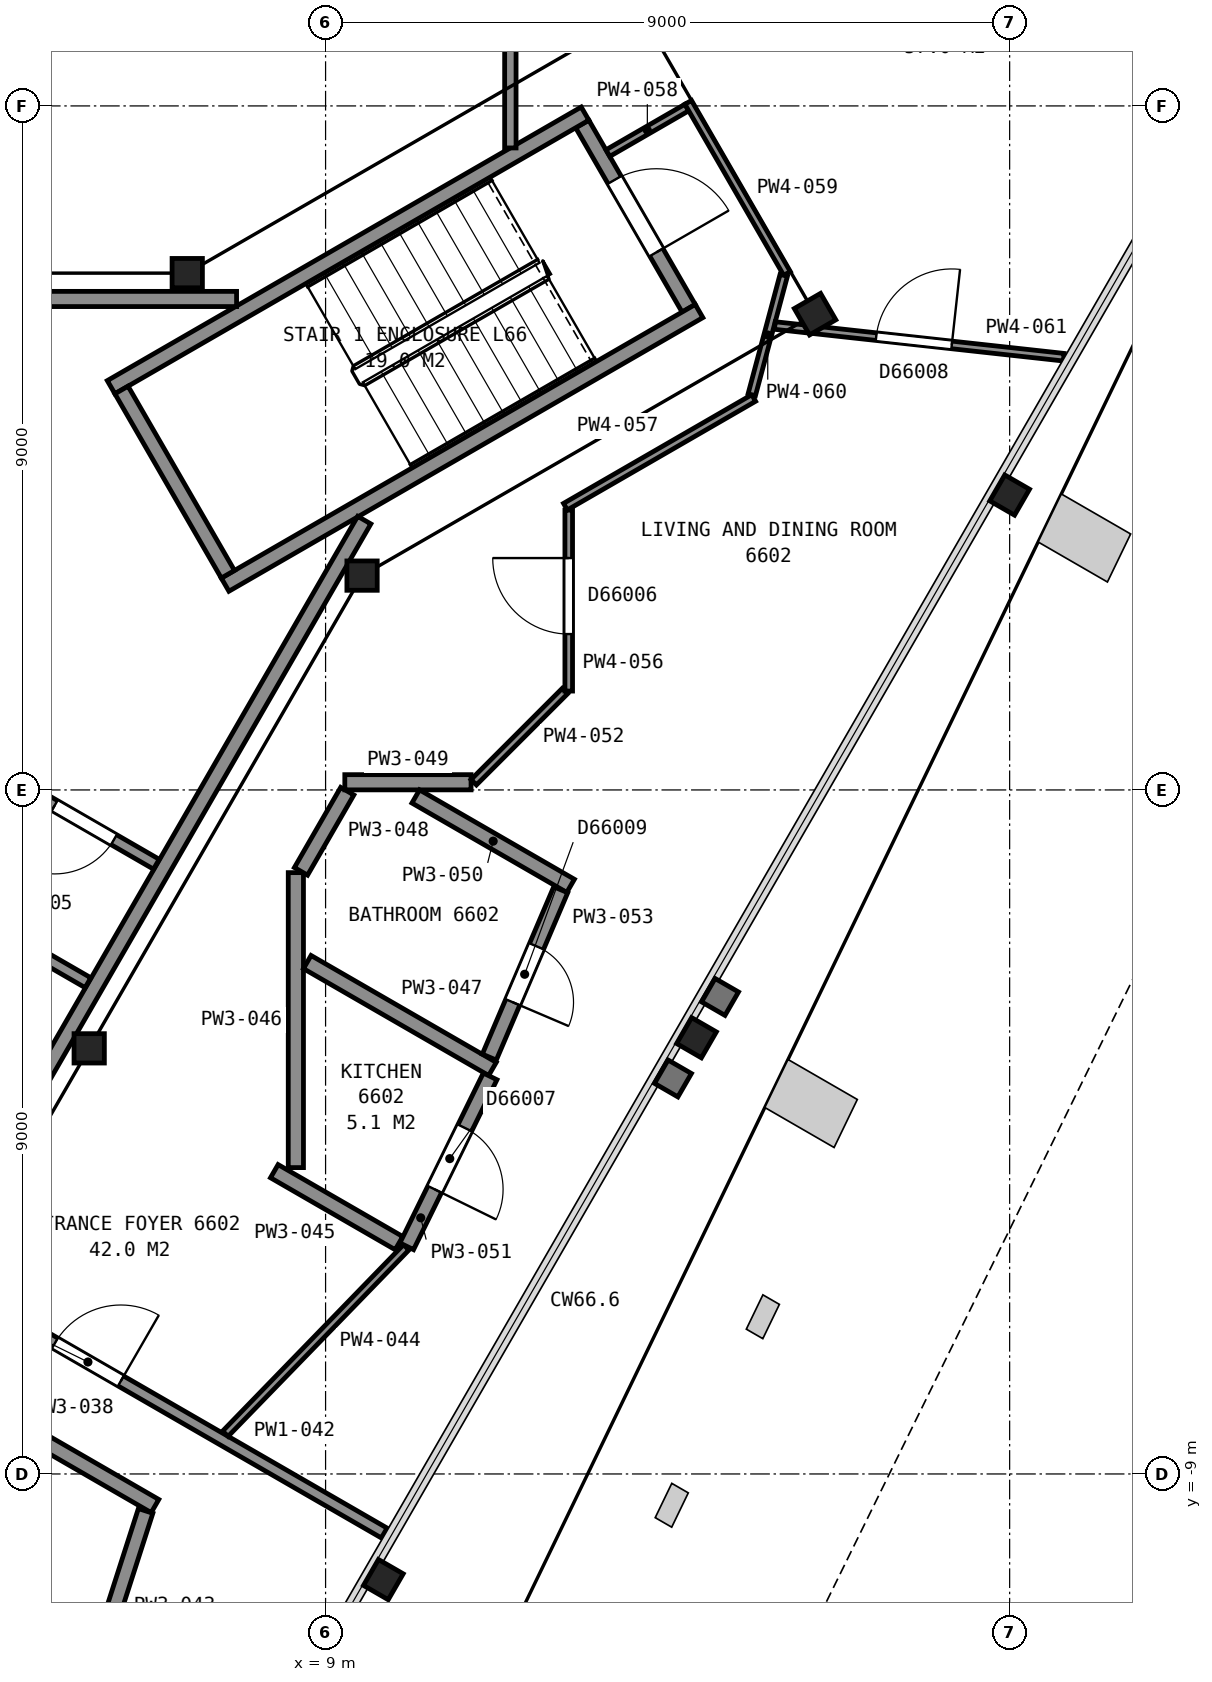
"""IFC4 building model, lengths in metres.
Left out: names, types, materials, properties, quantities, classifications, styles, units other than length and angle.
Written with IfcOpenShell. Run it as: python <this file> out.ifc"""

import sys

from ifc_helpers import new_model, si_unit, direction, frame, frame_2d, origin, origin_2d, place, context, subcontext, project, spatial, rectangle, i_section, extrude, element, fill, save


model = new_model("IFC4")
c1 = context("Model", 3, precision=1e-05, world=origin(), true_north=direction((0.0, 1.0)))
c2 = subcontext(c1, "Body", "Model", "MODEL_VIEW")
j1 = project(units=[si_unit("LENGTHUNIT", "METRE"), si_unit("PLANEANGLEUNIT", "RADIAN")], contexts=[c1])
p1 = place(None, origin())
s1 = spatial("IfcSite", under=j1, at=p1, CompositionType="ELEMENT")
p2 = place(p1, origin())
s2 = spatial("IfcBuilding", under=s1, at=p2, CompositionType="ELEMENT")
p3 = place(p2, frame((0.0, 0.0, 264.0)))
s3 = spatial("IfcBuildingStorey", under=s2, at=p3, CompositionType="ELEMENT", Elevation=264.0)
for number, where, z_axis, x_axis in (
    (1, (9.76, -10.39, 0.0), (0.0, 0.0, 1.0), (-0.5, -0.866, 0.0)),
    (2, (13.88, -3.26, 0.0), (0.0, 0.0, 1.0), (-0.5, -0.866, 0.0)),
    (3, (18.0, 3.88, 0.0), (0.0, 0.0, 1.0), (-0.5, -0.866, 0.0)),
):
    element("IfcColumn", number, at=place(p3, frame(where, z_axis=z_axis, x_axis=x_axis)), inside=s3, PredefinedType="COLUMN", context=c2, shape_type="SweptSolid", body=[
        extrude(i_section(OverallWidth=0.394, OverallDepth=0.376, WebThickness=0.017, FlangeThickness=0.028, FilletRadius=0.015, at=origin_2d()), origin(), (0.0, 0.0, 1.0), 3.7),
    ])
p4 = place(p3, frame((9.48, 2.82, 0.065), z_axis=(0.0, 0.0, 1.0), x_axis=(1.0, 0.0, 0.0)))
e4 = element("IfcColumn", 4, at=p4, inside=s3, PredefinedType="COLUMN", context=c2, shape_type="SweptSolid", body=[
    extrude(i_section(OverallWidth=0.399, OverallDepth=0.386, WebThickness=0.021, FlangeThickness=0.033, FilletRadius=0.015, at=origin_2d()), origin(), (0.0, 0.0, 1.0), 3.635),
])
p5 = place(p3, frame((15.44, 6.26, 0.05), z_axis=(0.0, 0.0, 1.0), x_axis=(0.5, -0.866025403784, 0.0)))
e5 = element("IfcColumn", 5, at=p5, inside=s3, PredefinedType="COLUMN", context=c2, shape_type="SweptSolid", body=[
    extrude(i_section(OverallWidth=0.401, OverallDepth=0.399, WebThickness=0.025, FlangeThickness=0.04, FilletRadius=0.015, at=origin_2d()), origin(), (0.0, 0.0, 1.0), 3.65),
])
p6 = place(p3, frame((7.18, 6.8, 0.065), z_axis=(0.0, 0.0, 1.0), x_axis=(1.0, 0.0, 0.0)))
e6 = element("IfcColumn", 6, at=p6, inside=s3, PredefinedType="COLUMN", context=c2, shape_type="SweptSolid", body=[
    extrude(i_section(OverallWidth=0.399, OverallDepth=0.386, WebThickness=0.021, FlangeThickness=0.033, FilletRadius=0.015, at=origin_2d()), origin(), (0.0, 0.0, 1.0), 3.635),
])
p7 = place(p3, frame((5.89, -3.4, 0.04), z_axis=(0.0, 0.0, 1.0), x_axis=(1.0, 0.0, 0.0)))
e7 = element("IfcColumn", 7, at=p7, inside=s3, PredefinedType="COLUMN", context=c2, shape_type="SweptSolid", body=[
    extrude(i_section(OverallWidth=0.399, OverallDepth=0.386, WebThickness=0.021, FlangeThickness=0.033, FilletRadius=0.015, at=origin_2d()), origin(), (0.0, 0.0, 1.0), 3.66),
])
p8 = place(p3, frame((13.777, 6.338, 0.0), z_axis=(0.0, 0.0, 1.0), x_axis=(-0.500049511043, 0.865996816683, 0.0)))
e8 = element("IfcWall", 8, at=p8, inside=s3, PredefinedType="PARTITIONING", context=c2, shape_type="SweptSolid", body=[
    extrude(rectangle(XDim=2.8, YDim=0.2, at=frame_2d((1.4, 0.0))), origin(), (0.0, 0.0, 1.0), 3.45),
])
p9 = place(p8, frame((0.85, 0.0, 0.0)))
e9 = element("IfcOpeningElement", 9, at=p9, cuts=e8, PredefinedType="OPENING", context=c2, shape_type="SweptSolid", body=[
    extrude(rectangle(XDim=1.1, YDim=2.1, at=frame_2d((0.55, 1.05))), frame((0.0, 0.11, 0.0), z_axis=(0.0, -1.0, 0.0), x_axis=(1.0, 0.0, 0.0)), (0.0, 0.0, 1.0), 0.22),
])
for number, where, z_axis, x_axis in (
    (10, (6.178, 5.299, 0.0), (0.0, 0.0, 1.0), (0.866, 0.5, 0.0)),
    (11, (7.678, 2.701, 0.0), (0.0, 0.0, 1.0), (0.866, 0.5, 0.0)),
):
    element("IfcWall", number, at=place(p3, frame(where, z_axis=z_axis, x_axis=x_axis)), inside=s3, PredefinedType="PARTITIONING", context=c2, shape_type="SweptSolid", body=[
        extrude(rectangle(XDim=7.2, YDim=0.2, at=frame_2d((3.6, 0.0))), origin(), (0.0, 0.0, 1.0), 3.45),
    ])
p10 = place(p3, frame((7.715, 2.838, 0.0), z_axis=(0.0, 0.0, 1.0), x_axis=(-0.500049511043, 0.865996816683, 0.0)))
e12 = element("IfcWall", 12, at=p10, inside=s3, PredefinedType="PARTITIONING", context=c2, shape_type="SweptSolid", body=[
    extrude(rectangle(XDim=2.8, YDim=0.2, at=frame_2d((1.4, 0.0))), origin(), (0.0, 0.0, 1.0), 3.45),
])
p11 = place(p3, frame((7.829, 6.46, 0.0), z_axis=(0.0, 0.0, 1.0), x_axis=(-1.0, 0.0, 0.0)))
e13 = element("IfcWall", 13, at=p11, inside=s3, PredefinedType="PARTITIONING", context=c2, shape_type="SweptSolid", body=[
    extrude(rectangle(XDim=15.658, YDim=0.2, at=frame_2d((7.829, 0.0))), origin(), (0.0, 0.0, 1.0), 3.45),
])
p12 = place(p11, frame((12.168, 0.0, 0.0)))
e14 = element("IfcOpeningElement", 14, at=p12, cuts=e13, PredefinedType="OPENING", context=c2, shape_type="SweptSolid", body=[
    extrude(rectangle(XDim=1.2, YDim=2.1, at=frame_2d((0.6, 1.05))), frame((0.0, 0.11, 0.0), z_axis=(0.0, -1.0, 0.0), x_axis=(1.0, 0.0, 0.0)), (0.0, 0.0, 1.0), 0.22),
])
p13 = place(p3, frame((3.828, -6.29, 0.0), z_axis=(0.0, 0.0, 1.0), x_axis=(0.499979739078, 0.866037101117, 0.0)))
e15 = element("IfcWall", 15, at=p13, inside=s3, PredefinedType="PARTITIONING", context=c2, shape_type="SweptSolid", body=[
    extrude(rectangle(XDim=11.363, YDim=0.2, at=frame_2d((5.681, 0.0))), origin(), (0.0, 0.0, 1.0), 3.45),
])
p14 = place(p13, frame((0.55, 0.0, 0.0)))
e16 = element("IfcOpeningElement", 16, at=p14, cuts=e15, PredefinedType="OPENING", context=c2, shape_type="SweptSolid", body=[
    extrude(rectangle(XDim=1.2, YDim=2.1, at=frame_2d((0.6, 1.05))), frame((0.0, 0.11, 0.0), z_axis=(0.0, -1.0, 0.0), x_axis=(1.0, 0.0, 0.0)), (0.0, 0.0, 1.0), 0.22),
])
p15 = place(p3, frame((3.951, -1.427, 0.0), z_axis=(0.0, 0.0, 1.0), x_axis=(0.866062920605, -0.499935013329, 0.0)))
e17 = element("IfcWall", 17, at=p15, inside=s3, PredefinedType="PARTITIONING", context=c2, shape_type="SweptSolid", body=[
    extrude(rectangle(XDim=2.22, YDim=0.15, at=frame_2d((1.11, 0.0))), origin(), (0.0, 0.0, 1.0), 3.45),
])
p16 = place(p3, frame((6.774, -0.978, 0.0), z_axis=(0.0, 0.0, 1.0), x_axis=(-0.866062920605, 0.499935013329, 0.0)))
e18 = element("IfcWall", 18, at=p16, inside=s3, PredefinedType="PARTITIONING", context=c2, shape_type="SweptSolid", body=[
    extrude(rectangle(XDim=2.22, YDim=0.15, at=frame_2d((1.11, 0.0))), origin(), (0.0, 0.0, 1.0), 3.45),
])
p17 = place(p16, frame((0.646, 0.0, 0.0)))
e19 = element("IfcOpeningElement", 19, at=p17, cuts=e18, PredefinedType="OPENING", context=c2, shape_type="SweptSolid", body=[
    extrude(rectangle(XDim=0.9, YDim=2.1, at=frame_2d((0.45, 1.05))), frame((0.0, 0.085, 0.0), z_axis=(0.0, -1.0, 0.0), x_axis=(1.0, 0.0, 0.0)), (0.0, 0.0, 1.0), 0.17),
])
p18 = place(p3, frame((3.498, -7.541, 0.0), z_axis=(0.0, 0.0, 1.0), x_axis=(0.865985624761, -0.500068892961, 0.0)))
e20 = element("IfcWall", 20, at=p18, inside=s3, PredefinedType="PARTITIONING", context=c2, shape_type="SweptSolid", body=[
    extrude(rectangle(XDim=3.762, YDim=0.2, at=frame_2d((1.881, 0.0))), origin(), (0.0, 0.0, 1.0), 2.723),
])
p19 = place(p3, frame((3.682, -10.65, 0.0), z_axis=(0.0, 0.0, 1.0), x_axis=(0.86607302589, -0.499917507021, 0.0)))
e21 = element("IfcWall", 21, at=p19, inside=s3, PredefinedType="PARTITIONING", context=c2, shape_type="SweptSolid", body=[
    extrude(rectangle(XDim=2.384, YDim=0.2, at=frame_2d((1.192, 0.0))), origin(), (0.0, 0.0, 1.0), 2.723),
])
p20 = place(p19, frame((0.85, 0.0, 0.0)))
e22 = element("IfcOpeningElement", 22, at=p20, cuts=e21, PredefinedType="OPENING", context=c2, shape_type="SweptSolid", body=[
    extrude(rectangle(XDim=0.9, YDim=2.1, at=frame_2d((0.45, 1.05))), frame((0.0, 0.11, 0.0), z_axis=(0.0, -1.0, 0.0), x_axis=(1.0, 0.0, 0.0)), (0.0, 0.0, 1.0), 0.22),
])
p21 = place(p3, frame((9.772, -9.777, 0.0), z_axis=(0.0, 0.0, 1.0), x_axis=(-0.866083818164, 0.499898809675, 0.0)))
e23 = element("IfcWall", 23, at=p21, inside=s3, PredefinedType="PARTITIONING", context=c2, shape_type="SweptSolid", body=[
    extrude(rectangle(XDim=6.551, YDim=0.15, at=frame_2d((3.275, 0.0))), origin(), (0.0, 0.0, 1.0), 2.723),
])
p22 = place(p21, frame((4.001, 0.0, 0.0)))
e24 = element("IfcOpeningElement", 24, at=p22, cuts=e23, PredefinedType="OPENING", context=c2, shape_type="SweptSolid", body=[
    extrude(rectangle(XDim=1.0, YDim=2.1, at=frame_2d((0.5, 1.05))), frame((0.0, 0.085, 0.0), z_axis=(0.0, -1.0, 0.0), x_axis=(1.0, 0.0, 0.0)), (0.0, 0.0, 1.0), 0.17),
])
p23 = place(p3, frame((5.824, -11.999, 0.0), z_axis=(0.0, 0.0, 1.0), x_axis=(0.306054089199, 0.95201412515, 0.0)))
e25 = element("IfcWall", 25, at=p23, inside=s3, PredefinedType="PARTITIONING", context=c2, shape_type="SweptSolid", body=[
    extrude(rectangle(XDim=2.64, YDim=0.2, at=frame_2d((1.32, 0.0))), origin(), (0.0, 0.0, 1.0), 2.723),
])
p24 = place(p3, frame((7.682, -8.47, 0.0), z_axis=(0.0, 0.0, 1.0), x_axis=(0.696344433623, 0.717707760696, 0.0)))
e26 = element("IfcWall", 26, at=p24, inside=s3, PredefinedType="PARTITIONING", context=c2, shape_type="SweptSolid", body=[
    extrude(rectangle(XDim=3.417, YDim=0.1, at=frame_2d((1.708, 0.0))), origin(), (0.0, 0.0, 1.0), 2.723),
])
p25 = place(p3, frame((8.325, -5.016, 0.0), z_axis=(0.0, 0.0, 1.0), x_axis=(0.866093293964, -0.499882392319, 0.0)))
e27 = element("IfcWall", 27, at=p25, inside=s3, PredefinedType="PARTITIONING", context=c2, shape_type="SweptSolid", body=[
    extrude(rectangle(XDim=1.894, YDim=0.2, at=frame_2d((0.947, 0.0))), origin(), (0.0, 0.0, 1.0), 2.723),
])
p26 = place(p3, frame((8.609, -4.969, 0.0), z_axis=(0.0, 0.0, 1.0), x_axis=(0.0, 1.0, 0.0)))
e28 = element("IfcWall", 28, at=p26, inside=s3, PredefinedType="PARTITIONING", context=c2, shape_type="SweptSolid", body=[
    extrude(rectangle(XDim=3.881, YDim=0.2, at=frame_2d((1.94, 0.0))), origin(), (0.0, 0.0, 1.0), 2.723),
])
p27 = place(p3, frame((8.759, -2.265, 0.0), z_axis=(0.0, 0.0, 1.0), x_axis=(0.866098885879, -0.499872703674, 0.0)))
e29 = element("IfcWall", 29, at=p27, inside=s3, PredefinedType="PARTITIONING", context=c2, shape_type="SweptSolid", body=[
    extrude(rectangle(XDim=2.813, YDim=0.2, at=frame_2d((1.407, 0.0))), origin(), (0.0, 0.0, 1.0), 2.723),
])
p28 = place(p3, frame((8.677, -1.071, 0.0), z_axis=(0.0, 0.0, 1.0), x_axis=(0.499803412959, 0.86613887362, 0.0)))
e30 = element("IfcWall", 30, at=p28, inside=s3, PredefinedType="PARTITIONING", context=c2, shape_type="SweptSolid", body=[
    extrude(rectangle(XDim=1.218, YDim=0.2, at=frame_2d((0.609, 0.0))), origin(), (0.0, 0.0, 1.0), 2.723),
])
p29 = place(p3, frame((9.253, 0.101, 0.0), z_axis=(0.0, 0.0, 1.0), x_axis=(1.0, 0.0, 0.0)))
e31 = element("IfcWall", 31, at=p29, inside=s3, PredefinedType="PARTITIONING", context=c2, shape_type="SweptSolid", body=[
    extrude(rectangle(XDim=1.661, YDim=0.2, at=frame_2d((0.831, 0.0))), origin(), (0.0, 0.0, 1.0), 2.723),
])
p30 = place(p3, frame((10.186, -0.086, 0.0), z_axis=(0.0, 0.0, 1.0), x_axis=(0.866024864377, -0.50000093428, 0.0)))
e32 = element("IfcWall", 32, at=p30, inside=s3, PredefinedType="PARTITIONING", context=c2, shape_type="SweptSolid", body=[
    extrude(rectangle(XDim=2.353, YDim=0.2, at=frame_2d((1.176, 0.0))), origin(), (0.0, 0.0, 1.0), 2.723),
])
p31 = place(p3, frame((10.068, -6.005, 0.0), z_axis=(0.0, 0.0, 1.0), x_axis=(0.440614307878, 0.897696514248, 0.0)))
e33 = element("IfcWall", 33, at=p31, inside=s3, PredefinedType="PARTITIONING", context=c2, shape_type="SweptSolid", body=[
    extrude(rectangle(XDim=2.491, YDim=0.2, at=frame_2d((1.245, 0.0))), origin(), (0.0, 0.0, 1.0), 2.723),
])
p32 = place(p31, frame((0.835, 0.0, 0.0)))
e34 = element("IfcOpeningElement", 34, at=p32, cuts=e33, PredefinedType="OPENING", context=c2, shape_type="SweptSolid", body=[
    extrude(rectangle(XDim=0.9, YDim=2.1, at=frame_2d((0.45, 1.05))), frame((0.0, 0.11, 0.0), z_axis=(0.0, -1.0, 0.0), x_axis=(1.0, 0.0, 0.0)), (0.0, 0.0, 1.0), 0.22),
])
p33 = place(p3, frame((10.949, 0.101, 0.0), z_axis=(0.0, 0.0, 1.0), x_axis=(0.707106781187, 0.707106781187, 0.0)))
e35 = element("IfcWall", 35, at=p33, inside=s3, PredefinedType="PARTITIONING", context=c2, shape_type="SweptSolid", body=[
    extrude(rectangle(XDim=1.698, YDim=0.1, at=frame_2d((0.849, 0.0))), origin(), (0.0, 0.0, 1.0), 2.723),
])
p34 = place(p3, frame((11.154, -3.515, 0.0), z_axis=(0.0, 0.0, 1.0), x_axis=(0.392515754301, 0.919745281383, 0.0)))
e36 = element("IfcWall", 36, at=p34, inside=s3, PredefinedType="PARTITIONING", context=c2, shape_type="SweptSolid", body=[
    extrude(rectangle(XDim=2.394, YDim=0.2, at=frame_2d((1.197, 0.0))), origin(), (0.0, 0.0, 1.0), 2.723),
])
p35 = place(p34, frame((0.785, 0.0, 0.0)))
e37 = element("IfcOpeningElement", 37, at=p35, cuts=e36, PredefinedType="OPENING", context=c2, shape_type="SweptSolid", body=[
    extrude(rectangle(XDim=0.8, YDim=2.1, at=frame_2d((0.4, 1.05))), frame((0.0, 0.11, 0.0), z_axis=(0.0, -1.0, 0.0), x_axis=(1.0, 0.0, 0.0)), (0.0, 0.0, 1.0), 0.22),
])
p36 = place(p3, frame((11.431, 8.447, 0.0), z_axis=(0.0, 0.0, 1.0), x_axis=(0.0, 1.0, 0.0)))
e38 = element("IfcWall", 38, at=p36, inside=s3, PredefinedType="PARTITIONING", context=c2, shape_type="SweptSolid", body=[
    extrude(rectangle(XDim=2.838, YDim=0.15, at=frame_2d((1.419, 0.0))), origin(), (0.0, 0.0, 1.0), 2.723),
])
p37 = place(p3, frame((12.199, 3.682, 0.0), z_axis=(0.0, 0.0, 1.0), x_axis=(0.0, -1.0, 0.0)))
e39 = element("IfcWall", 39, at=p37, inside=s3, PredefinedType="PARTITIONING", context=c2, shape_type="SweptSolid", body=[
    extrude(rectangle(XDim=2.381, YDim=0.1, at=frame_2d((1.19, 0.0))), origin(), (0.0, 0.0, 1.0), 2.723),
])
p38 = place(p37, frame((0.631, 0.0, 0.0)))
e40 = element("IfcOpeningElement", 40, at=p38, cuts=e39, PredefinedType="OPENING", context=c2, shape_type="SweptSolid", body=[
    extrude(rectangle(XDim=1.0, YDim=2.1, at=frame_2d((0.5, 1.05))), frame((0.0, 0.06, 0.0), z_axis=(0.0, -1.0, 0.0), x_axis=(1.0, 0.0, 0.0)), (0.0, 0.0, 1.0), 0.12),
])
p39 = place(p3, frame((12.156, 3.727, 0.0), z_axis=(0.0, 0.0, 1.0), x_axis=(0.866012137121, 0.500022977831, 0.0)))
e41 = element("IfcWall", 41, at=p39, inside=s3, PredefinedType="PARTITIONING", context=c2, shape_type="SweptSolid", body=[
    extrude(rectangle(XDim=2.86, YDim=0.1, at=frame_2d((1.43, 0.0))), origin(), (0.0, 0.0, 1.0), 2.723),
])
p40 = place(p3, frame((12.714, 8.379, 0.0), z_axis=(0.0, 0.0, 1.0), x_axis=(0.86585331735, 0.500297944063, 0.0)))
e42 = element("IfcWall", 42, at=p40, inside=s3, PredefinedType="PARTITIONING", context=c2, shape_type="SweptSolid", body=[
    extrude(rectangle(XDim=1.199, YDim=0.1, at=frame_2d((0.6, 0.0))), origin(), (0.0, 0.0, 1.0), 2.723),
])
p41 = place(p3, frame((13.771, 9.047, 0.0), z_axis=(0.0, 0.0, 1.0), x_axis=(0.500006934395, -0.866021400173, 0.0)))
e43 = element("IfcWall", 43, at=p41, inside=s3, PredefinedType="PARTITIONING", context=c2, shape_type="SweptSolid", body=[
    extrude(rectangle(XDim=2.6, YDim=0.1, at=frame_2d((1.3, 0.0))), origin(), (0.0, 0.0, 1.0), 2.723),
])
p42 = place(p3, frame((14.607, 5.2, 0.0), z_axis=(0.0, 0.0, 1.0), x_axis=(0.258531076101, 0.966002941346, 0.0)))
e44 = element("IfcWall", 44, at=p42, inside=s3, PredefinedType="PARTITIONING", context=c2, shape_type="SweptSolid", body=[
    extrude(rectangle(XDim=1.627, YDim=0.1, at=frame_2d((0.813, 0.0))), origin(), (0.0, 0.0, 1.0), 2.723),
])
p43 = place(p3, frame((14.911, 6.111, 0.0), z_axis=(0.0, 0.0, 1.0), x_axis=(0.994040808037, -0.10900858662, 0.0)))
e45 = element("IfcWall", 45, at=p43, inside=s3, PredefinedType="PARTITIONING", context=c2, shape_type="SweptSolid", body=[
    extrude(rectangle(XDim=3.823, YDim=0.1, at=frame_2d((1.912, 0.0))), origin(), (0.0, 0.0, 1.0), 2.723),
])
p44 = place(p43, frame((1.342, 0.0, 0.0)))
e46 = element("IfcOpeningElement", 46, at=p44, cuts=e45, PredefinedType="OPENING", context=c2, shape_type="SweptSolid", body=[
    extrude(rectangle(XDim=1.0, YDim=2.1, at=frame_2d((0.5, 1.05))), frame((0.0, 0.06, 0.0), z_axis=(0.0, -1.0, 0.0), x_axis=(1.0, 0.0, 0.0)), (0.0, 0.0, 1.0), 0.12),
])
p45 = place(p9, origin())
e47 = element("IfcDoor", 47, at=p45, inside=s3, OperationType="SINGLE_SWING_LEFT", PredefinedType="DOOR", context=c2, shape_type="SweptSolid", body=[
    extrude(rectangle(XDim=1.1, YDim=2.1, at=frame_2d((0.55, 1.05))), frame((0.0, 0.025, 0.0), z_axis=(0.0, -1.0, 0.0), x_axis=(1.0, 0.0, 0.0)), (0.0, 0.0, 1.0), 0.05),
])
fill(e9, e47)
p46 = place(p17, origin())
e48 = element("IfcDoor", 48, at=p46, inside=s3, OperationType="SINGLE_SWING_RIGHT", PredefinedType="DOOR", context=c2, shape_type="SweptSolid", body=[
    extrude(rectangle(XDim=0.9, YDim=2.1, at=frame_2d((0.45, 1.05))), frame((0.0, 0.025, 0.0), z_axis=(0.0, -1.0, 0.0), x_axis=(1.0, 0.0, 0.0)), (0.0, 0.0, 1.0), 0.05),
])
fill(e19, e48)
p47 = place(p22, origin())
e49 = element("IfcDoor", 49, at=p47, inside=s3, OperationType="SINGLE_SWING_LEFT", PredefinedType="DOOR", context=c2, shape_type="SweptSolid", body=[
    extrude(rectangle(XDim=1.0, YDim=2.1, at=frame_2d((0.5, 1.05))), frame((0.0, 0.025, 0.0), z_axis=(0.0, -1.0, 0.0), x_axis=(1.0, 0.0, 0.0)), (0.0, 0.0, 1.0), 0.05),
])
fill(e24, e49)
p48 = place(p32, origin())
e50 = element("IfcDoor", 50, at=p48, inside=s3, OperationType="SINGLE_SWING_LEFT", PredefinedType="DOOR", context=c2, shape_type="SweptSolid", body=[
    extrude(rectangle(XDim=0.9, YDim=2.1, at=frame_2d((0.45, 1.05))), frame((0.0, 0.025, 0.0), z_axis=(0.0, -1.0, 0.0), x_axis=(1.0, 0.0, 0.0)), (0.0, 0.0, 1.0), 0.05),
])
fill(e34, e50)
p49 = place(p35, origin())
e51 = element("IfcDoor", 51, at=p49, inside=s3, OperationType="SINGLE_SWING_LEFT", PredefinedType="DOOR", context=c2, shape_type="SweptSolid", body=[
    extrude(rectangle(XDim=0.8, YDim=2.1, at=frame_2d((0.4, 1.05))), frame((0.0, 0.025, 0.0), z_axis=(0.0, -1.0, 0.0), x_axis=(1.0, 0.0, 0.0)), (0.0, 0.0, 1.0), 0.05),
])
fill(e37, e51)
p50 = place(p38, origin())
e52 = element("IfcDoor", 52, at=p50, inside=s3, OperationType="SINGLE_SWING_LEFT", PredefinedType="DOOR", context=c2, shape_type="SweptSolid", body=[
    extrude(rectangle(XDim=1.0, YDim=2.1, at=frame_2d((0.5, 1.05))), frame((0.0, 0.025, 0.0), z_axis=(0.0, -1.0, 0.0), x_axis=(1.0, 0.0, 0.0)), (0.0, 0.0, 1.0), 0.05),
])
fill(e40, e52)
p51 = place(p44, origin())
e53 = element("IfcDoor", 53, at=p51, inside=s3, OperationType="SINGLE_SWING_RIGHT", PredefinedType="DOOR", context=c2, shape_type="SweptSolid", body=[
    extrude(rectangle(XDim=1.0, YDim=2.1, at=frame_2d((0.5, 1.05))), frame((0.0, 0.025, 0.0), z_axis=(0.0, -1.0, 0.0), x_axis=(1.0, 0.0, 0.0)), (0.0, 0.0, 1.0), 0.05),
])
fill(e46, e53)
save(model, sys.argv[1])
